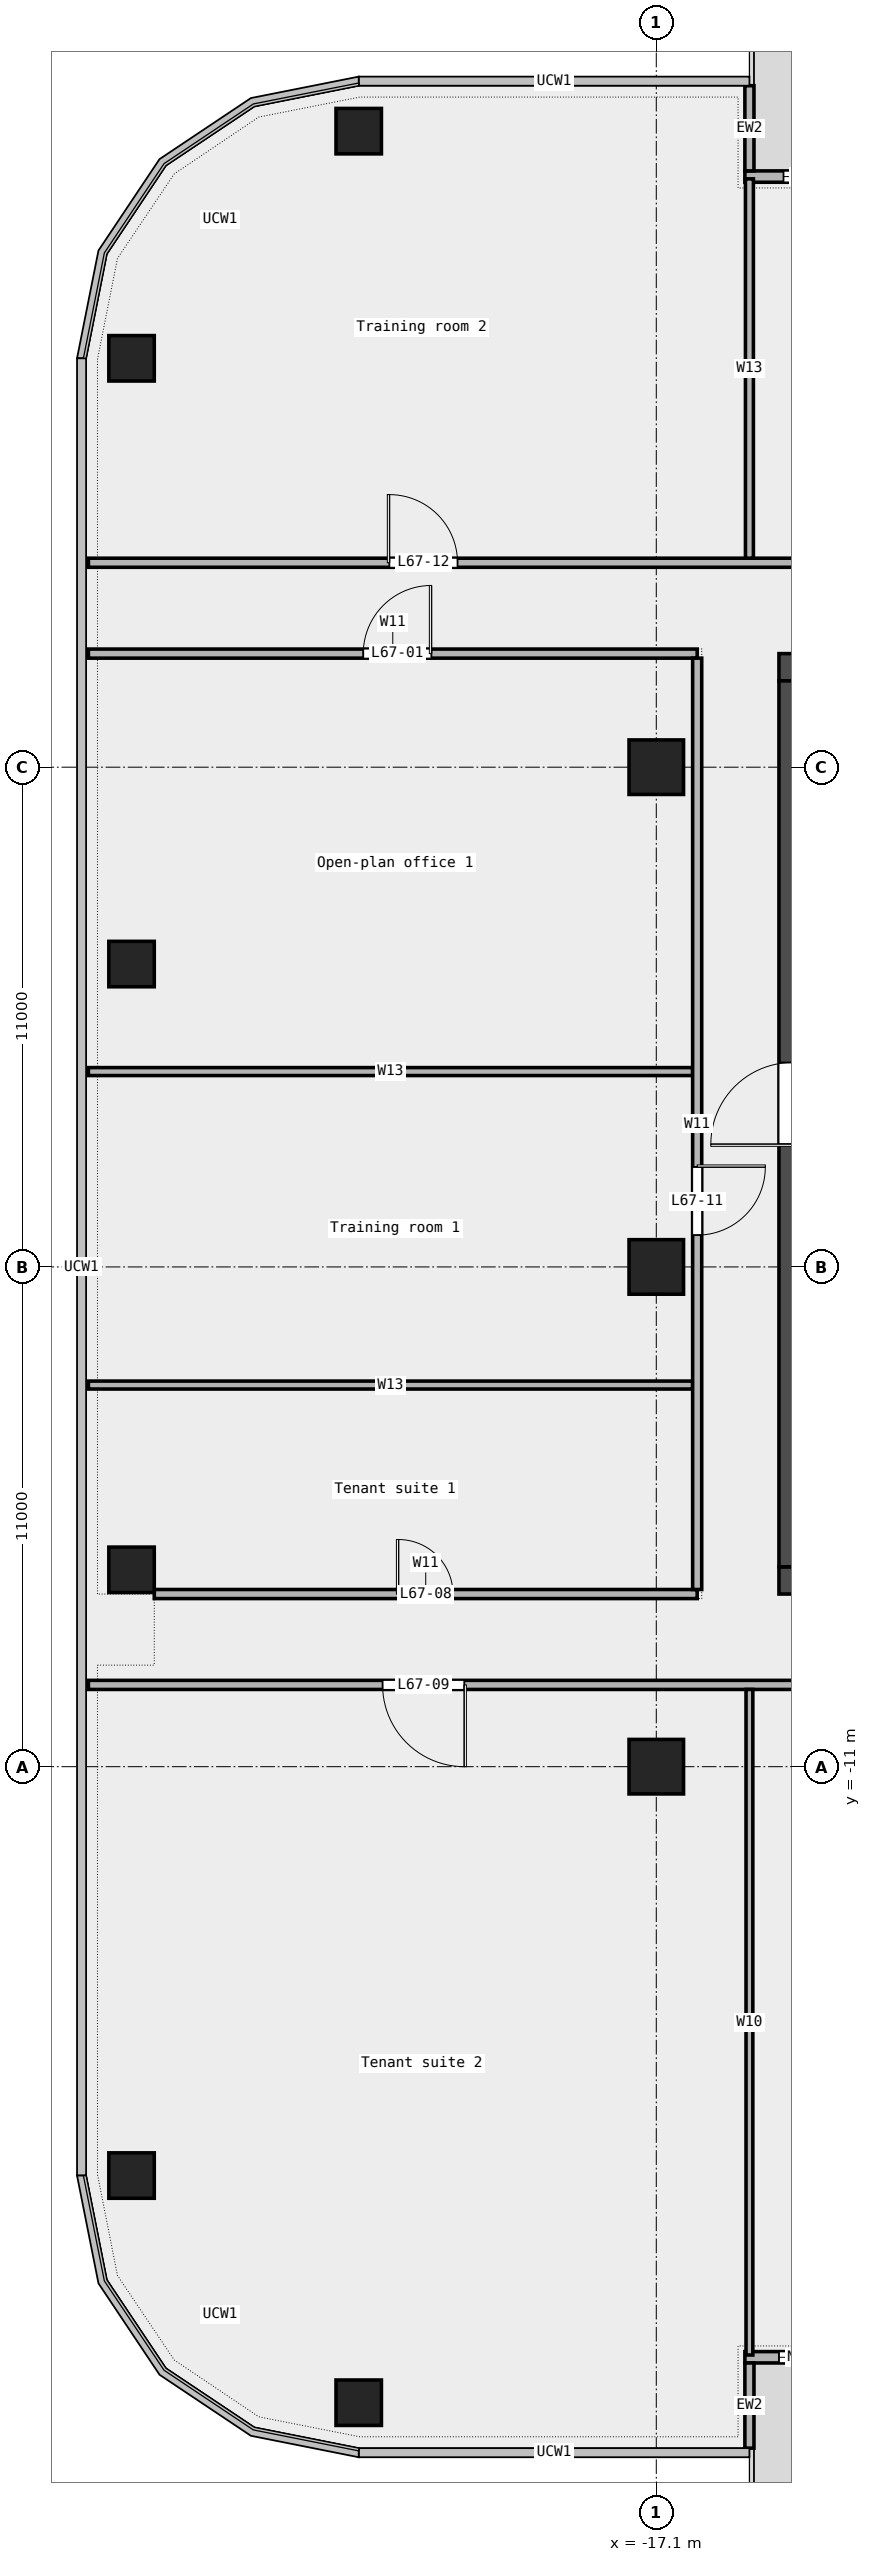
"""IFC4 building model, lengths in metres.
Left out: names, types, materials, properties, quantities, classifications, styles, units other than length and angle.
Written with IfcOpenShell. Run it as: python <this file> out.ifc"""

import sys

from ifc_helpers import new_model, si_unit, direction, frame, frame_2d, origin, origin_2d, place, context, subcontext, project, spatial, rectangle, extrude, element, fill, save


model = new_model("IFC4")
c1 = context("Model", 3, precision=1e-05, world=origin(), true_north=direction((0.0, 1.0)))
c2 = subcontext(c1, "Body", "Model", "MODEL_VIEW")
j1 = project(units=[si_unit("LENGTHUNIT", "METRE"), si_unit("PLANEANGLEUNIT", "RADIAN")], contexts=[c1])
p1 = place(None, origin())
s1 = spatial("IfcSite", under=j1, at=p1, CompositionType="ELEMENT")
p2 = place(p1, origin())
s2 = spatial("IfcBuilding", under=s1, at=p2, CompositionType="ELEMENT")
p3 = place(p2, frame((0.0, 0.0, 307.4)))
s3 = spatial("IfcBuildingStorey", under=s2, at=p3, CompositionType="ELEMENT", Elevation=307.4)
for number, where, z_axis, x_axis in (
    (1, (-23.65, -25.0, 0.0), (0.0, 0.0, 1.0), (1.0, 0.0, 0.0)),
    (2, (-23.65, 25.0, 0.0), (0.0, 0.0, 1.0), (1.0, 0.0, 0.0)),
    (3, (-28.65, 20.0, 0.0), (0.0, 0.0, 1.0), (1.0, 0.0, 0.0)),
    (4, (-28.65, 6.667, 0.0), (0.0, 0.0, 1.0), (1.0, 0.0, 0.0)),
    (5, (-28.65, -6.667, 0.0), (0.0, 0.0, 1.0), (1.0, 0.0, 0.0)),
    (6, (-28.65, -20.0, 0.0), (0.0, 0.0, 1.0), (1.0, 0.0, 0.0)),
):
    element("IfcColumn", number, at=place(p3, frame(where, z_axis=z_axis, x_axis=x_axis)), inside=s3, PredefinedType="COLUMN", context=c2, shape_type="SweptSolid", body=[
        extrude(rectangle(XDim=1.0, YDim=1.0, at=origin_2d()), origin(), (0.0, 0.0, 1.0), 3.6),
    ])
for number, where, z_axis, x_axis in (
    (7, (-17.1, -11.0, 0.0), (0.0, 0.0, 1.0), (1.0, 0.0, 0.0)),
    (8, (-17.1, 0.0, 0.0), (0.0, 0.0, 1.0), (1.0, 0.0, 0.0)),
    (9, (-17.1, 11.0, 0.0), (0.0, 0.0, 1.0), (1.0, 0.0, 0.0)),
):
    element("IfcColumn", number, at=place(p3, frame(where, z_axis=z_axis, x_axis=x_axis)), inside=s3, PredefinedType="COLUMN", context=c2, shape_type="SweptSolid", body=[
        extrude(rectangle(XDim=1.2, YDim=1.2, at=origin_2d()), origin(), (0.0, 0.0, 1.0), 3.6),
    ])
p4 = place(p3, frame((-2.05, 24.0, 0.0), z_axis=(0.0, 0.0, 1.0), x_axis=(-1.0, 0.0, 0.0)))
e10 = element("IfcWall", 10, at=p4, inside=s3, PredefinedType="STANDARD", context=c2, shape_type="SweptSolid", body=[
    extrude(rectangle(XDim=13.1, YDim=0.25, at=frame_2d((6.55, 0.0))), origin(), (0.0, 0.0, 1.0), 3.6),
])
p5 = place(p4, frame((1.5, 0.0, 0.45)))
e11 = element("IfcOpeningElement", 11, at=p5, cuts=e10, PredefinedType="OPENING", context=c2, shape_type="SweptSolid", body=[
    extrude(rectangle(XDim=1.5, YDim=2.4, at=frame_2d((0.75, 1.2))), frame((0.0, 0.137, 0.0), z_axis=(0.0, -1.0, 0.0), x_axis=(1.0, 0.0, 0.0)), (0.0, 0.0, 1.0), 0.274),
])
p6 = place(p4, frame((5.75, 0.0, 0.0)))
e12 = element("IfcOpeningElement", 12, at=p6, cuts=e10, PredefinedType="OPENING", context=c2, shape_type="SweptSolid", body=[
    extrude(rectangle(XDim=1.8, YDim=2.4, at=frame_2d((0.9, 1.2))), frame((0.0, 0.137, 0.0), z_axis=(0.0, -1.0, 0.0), x_axis=(1.0, 0.0, 0.0)), (0.0, 0.0, 1.0), 0.274),
])
p7 = place(p4, frame((10.75, 0.0, 0.45)))
e13 = element("IfcOpeningElement", 13, at=p7, cuts=e10, PredefinedType="OPENING", context=c2, shape_type="SweptSolid", body=[
    extrude(rectangle(XDim=1.5, YDim=2.4, at=frame_2d((0.75, 1.2))), frame((0.0, 0.137, 0.0), z_axis=(0.0, -1.0, 0.0), x_axis=(1.0, 0.0, 0.0)), (0.0, 0.0, 1.0), 0.274),
])
p8 = place(p3, frame((-15.05, 26.0, 0.0), z_axis=(0.0, 0.0, 1.0), x_axis=(0.0, -1.0, 0.0)))
e14 = element("IfcWall", 14, at=p8, inside=s3, PredefinedType="STANDARD", context=c2, shape_type="SweptSolid", body=[
    extrude(rectangle(XDim=1.875, YDim=0.2, at=frame_2d((0.938, 0.0))), origin(), (0.0, 0.0, 1.0), 3.6),
])
p9 = place(p3, frame((-15.15, -24.0, 0.0), z_axis=(0.0, 0.0, 1.0), x_axis=(1.0, 0.0, 0.0)))
e15 = element("IfcWall", 15, at=p9, inside=s3, PredefinedType="STANDARD", context=c2, shape_type="SweptSolid", body=[
    extrude(rectangle(XDim=13.1, YDim=0.25, at=frame_2d((6.55, 0.0))), origin(), (0.0, 0.0, 1.0), 3.6),
])
p10 = place(p9, frame((0.75, 0.0, 0.45)))
e16 = element("IfcOpeningElement", 16, at=p10, cuts=e15, PredefinedType="OPENING", context=c2, shape_type="SweptSolid", body=[
    extrude(rectangle(XDim=1.5, YDim=2.4, at=frame_2d((0.75, 1.2))), frame((0.0, 0.137, 0.0), z_axis=(0.0, -1.0, 0.0), x_axis=(1.0, 0.0, 0.0)), (0.0, 0.0, 1.0), 0.274),
])
p11 = place(p9, frame((5.75, 0.0, 0.0)))
e17 = element("IfcOpeningElement", 17, at=p11, cuts=e15, PredefinedType="OPENING", context=c2, shape_type="SweptSolid", body=[
    extrude(rectangle(XDim=1.8, YDim=2.4, at=frame_2d((0.9, 1.2))), frame((0.0, 0.137, 0.0), z_axis=(0.0, -1.0, 0.0), x_axis=(1.0, 0.0, 0.0)), (0.0, 0.0, 1.0), 0.274),
])
p12 = place(p9, frame((10.0, 0.0, 0.45)))
e18 = element("IfcOpeningElement", 18, at=p12, cuts=e15, PredefinedType="OPENING", context=c2, shape_type="SweptSolid", body=[
    extrude(rectangle(XDim=1.5, YDim=2.4, at=frame_2d((0.75, 1.2))), frame((0.0, 0.137, 0.0), z_axis=(0.0, -1.0, 0.0), x_axis=(1.0, 0.0, 0.0)), (0.0, 0.0, 1.0), 0.274),
])
p13 = place(p3, frame((-15.05, -26.0, 0.0), z_axis=(0.0, 0.0, 1.0), x_axis=(0.0, 1.0, 0.0)))
e19 = element("IfcWall", 19, at=p13, inside=s3, PredefinedType="STANDARD", context=c2, shape_type="SweptSolid", body=[
    extrude(rectangle(XDim=1.875, YDim=0.2, at=frame_2d((0.938, 0.0))), origin(), (0.0, 0.0, 1.0), 3.6),
])
p14 = place(p3, frame((-29.6, -9.2, 0.0), z_axis=(0.0, 0.0, 1.0), x_axis=(1.0, 0.0, 0.0)))
e20 = element("IfcWall", 20, at=p14, inside=s3, PredefinedType="PARTITIONING", context=c2, shape_type="SweptSolid", body=[
    extrude(rectangle(XDim=59.2, YDim=0.2, at=frame_2d((29.6, 0.0))), origin(), (0.0, 0.0, 1.0), 3.6),
])
p15 = place(p14, frame((47.615, 0.0, 0.0)))
e21 = element("IfcOpeningElement", 21, at=p15, cuts=e20, PredefinedType="OPENING", context=c2, shape_type="SweptSolid", body=[
    extrude(rectangle(XDim=1.8, YDim=2.1, at=frame_2d((0.9, 1.05))), frame((0.0, 0.112, 0.0), z_axis=(0.0, -1.0, 0.0), x_axis=(1.0, 0.0, 0.0)), (0.0, 0.0, 1.0), 0.224),
])
p16 = place(p14, frame((20.1, 0.0, 0.0)))
e22 = element("IfcOpeningElement", 22, at=p16, cuts=e20, PredefinedType="OPENING", context=c2, shape_type="SweptSolid", body=[
    extrude(rectangle(XDim=1.8, YDim=2.1, at=frame_2d((0.9, 1.05))), frame((0.0, 0.112, 0.0), z_axis=(0.0, -1.0, 0.0), x_axis=(1.0, 0.0, 0.0)), (0.0, 0.0, 1.0), 0.224),
])
p17 = place(p14, frame((6.475, 0.0, 0.0)))
e23 = element("IfcOpeningElement", 23, at=p17, cuts=e20, PredefinedType="OPENING", context=c2, shape_type="SweptSolid", body=[
    extrude(rectangle(XDim=1.8, YDim=2.1, at=frame_2d((0.9, 1.05))), frame((0.0, 0.112, 0.0), z_axis=(0.0, -1.0, 0.0), x_axis=(1.0, 0.0, 0.0)), (0.0, 0.0, 1.0), 0.224),
])
p18 = place(p14, frame((31.09, 0.0, 0.0)))
e24 = element("IfcOpeningElement", 24, at=p18, cuts=e20, PredefinedType="OPENING", context=c2, shape_type="SweptSolid", body=[
    extrude(rectangle(XDim=1.5, YDim=2.1, at=frame_2d((0.75, 1.05))), frame((0.0, 0.112, 0.0), z_axis=(0.0, -1.0, 0.0), x_axis=(1.0, 0.0, 0.0)), (0.0, 0.0, 1.0), 0.224),
])
p19 = place(p3, frame((-28.15, -7.2, 0.0), z_axis=(0.0, 0.0, 1.0), x_axis=(1.0, 0.0, 0.0)))
e25 = element("IfcWall", 25, at=p19, inside=s3, PredefinedType="PARTITIONING", context=c2, shape_type="SweptSolid", body=[
    extrude(rectangle(XDim=11.95, YDim=0.2, at=frame_2d((5.975, 0.0))), origin(), (0.0, 0.0, 1.0), 3.6),
])
p20 = place(p19, frame((5.375, 0.0, 0.0)))
e26 = element("IfcOpeningElement", 26, at=p20, cuts=e25, PredefinedType="OPENING", context=c2, shape_type="SweptSolid", body=[
    extrude(rectangle(XDim=1.2, YDim=2.1, at=frame_2d((0.6, 1.05))), frame((0.0, 0.112, 0.0), z_axis=(0.0, -1.0, 0.0), x_axis=(1.0, 0.0, 0.0)), (0.0, 0.0, 1.0), 0.224),
])
for number, where, z_axis, x_axis in (
    (27, (-29.6, -2.6, 0.0), (0.0, 0.0, 1.0), (1.0, 0.0, 0.0)),
    (28, (-29.6, 4.3, 0.0), (0.0, 0.0, 1.0), (1.0, 0.0, 0.0)),
):
    element("IfcWall", number, at=place(p3, frame(where, z_axis=z_axis, x_axis=x_axis)), inside=s3, PredefinedType="PARTITIONING", context=c2, shape_type="SweptSolid", body=[
        extrude(rectangle(XDim=13.3, YDim=0.175, at=frame_2d((6.65, 0.0))), origin(), (0.0, 0.0, 1.0), 3.6),
    ])
p21 = place(p3, frame((-29.6, 13.5, 0.0), z_axis=(0.0, 0.0, 1.0), x_axis=(1.0, 0.0, 0.0)))
e29 = element("IfcWall", 29, at=p21, inside=s3, PredefinedType="PARTITIONING", context=c2, shape_type="SweptSolid", body=[
    extrude(rectangle(XDim=13.4, YDim=0.2, at=frame_2d((6.7, 0.0))), origin(), (0.0, 0.0, 1.0), 3.6),
])
p22 = place(p21, frame((6.05, 0.0, 0.0)))
e30 = element("IfcOpeningElement", 30, at=p22, cuts=e29, PredefinedType="OPENING", context=c2, shape_type="SweptSolid", body=[
    extrude(rectangle(XDim=1.5, YDim=2.1, at=frame_2d((0.75, 1.05))), frame((0.0, 0.112, 0.0), z_axis=(0.0, -1.0, 0.0), x_axis=(1.0, 0.0, 0.0)), (0.0, 0.0, 1.0), 0.224),
])
p23 = place(p3, frame((-29.6, 15.5, 0.0), z_axis=(0.0, 0.0, 1.0), x_axis=(1.0, 0.0, 0.0)))
e31 = element("IfcWall", 31, at=p23, inside=s3, PredefinedType="PARTITIONING", context=c2, shape_type="SweptSolid", body=[
    extrude(rectangle(XDim=59.2, YDim=0.2, at=frame_2d((29.6, 0.0))), origin(), (0.0, 0.0, 1.0), 3.6),
])
p24 = place(p23, frame((20.25, 0.0, 0.0)))
e32 = element("IfcOpeningElement", 32, at=p24, cuts=e31, PredefinedType="OPENING", context=c2, shape_type="SweptSolid", body=[
    extrude(rectangle(XDim=1.5, YDim=2.1, at=frame_2d((0.75, 1.05))), frame((0.0, 0.112, 0.0), z_axis=(0.0, -1.0, 0.0), x_axis=(1.0, 0.0, 0.0)), (0.0, 0.0, 1.0), 0.224),
])
p25 = place(p23, frame((49.825, 0.0, 0.0)))
e33 = element("IfcOpeningElement", 33, at=p25, cuts=e31, PredefinedType="OPENING", context=c2, shape_type="SweptSolid", body=[
    extrude(rectangle(XDim=1.8, YDim=2.1, at=frame_2d((0.9, 1.05))), frame((0.0, 0.112, 0.0), z_axis=(0.0, -1.0, 0.0), x_axis=(1.0, 0.0, 0.0)), (0.0, 0.0, 1.0), 0.224),
])
p26 = place(p23, frame((34.05, 0.0, 0.0)))
e34 = element("IfcOpeningElement", 34, at=p26, cuts=e31, PredefinedType="OPENING", context=c2, shape_type="SweptSolid", body=[
    extrude(rectangle(XDim=1.8, YDim=2.1, at=frame_2d((0.9, 1.05))), frame((0.0, 0.112, 0.0), z_axis=(0.0, -1.0, 0.0), x_axis=(1.0, 0.0, 0.0)), (0.0, 0.0, 1.0), 0.224),
])
p27 = place(p23, frame((6.625, 0.0, 0.0)))
e35 = element("IfcOpeningElement", 35, at=p27, cuts=e31, PredefinedType="OPENING", context=c2, shape_type="SweptSolid", body=[
    extrude(rectangle(XDim=1.5, YDim=2.1, at=frame_2d((0.75, 1.05))), frame((0.0, 0.112, 0.0), z_axis=(0.0, -1.0, 0.0), x_axis=(1.0, 0.0, 0.0)), (0.0, 0.0, 1.0), 0.224),
])
p28 = place(p3, frame((-16.2, -7.1, 0.0), z_axis=(0.0, 0.0, 1.0), x_axis=(0.0, 1.0, 0.0)))
e36 = element("IfcWall", 36, at=p28, inside=s3, PredefinedType="PARTITIONING", context=c2, shape_type="SweptSolid", body=[
    extrude(rectangle(XDim=20.5, YDim=0.2, at=frame_2d((10.25, 0.0))), origin(), (0.0, 0.0, 1.0), 3.6),
])
p29 = place(p28, frame((7.8, 0.0, 0.0)))
e37 = element("IfcOpeningElement", 37, at=p29, cuts=e36, PredefinedType="OPENING", context=c2, shape_type="SweptSolid", body=[
    extrude(rectangle(XDim=1.5, YDim=2.1, at=frame_2d((0.75, 1.05))), frame((0.0, 0.112, 0.0), z_axis=(0.0, -1.0, 0.0), x_axis=(1.0, 0.0, 0.0)), (0.0, 0.0, 1.0), 0.224),
])
p30 = place(p3, frame((-15.05, -23.95, 0.0), z_axis=(0.0, 0.0, 1.0), x_axis=(0.0, 1.0, 0.0)))
e38 = element("IfcWall", 38, at=p30, inside=s3, PredefinedType="PARTITIONING", context=c2, shape_type="SweptSolid", body=[
    extrude(rectangle(XDim=14.65, YDim=0.15, at=frame_2d((7.325, 0.0))), origin(), (0.0, 0.0, 1.0), 3.6),
])
p31 = place(p3, frame((-15.05, 15.6, 0.0), z_axis=(0.0, 0.0, 1.0), x_axis=(0.0, 1.0, 0.0)))
e39 = element("IfcWall", 39, at=p31, inside=s3, PredefinedType="PARTITIONING", context=c2, shape_type="SweptSolid", body=[
    extrude(rectangle(XDim=8.35, YDim=0.175, at=frame_2d((4.175, 0.0))), origin(), (0.0, 0.0, 1.0), 3.6),
])
p32 = place(p3, frame((-14.4, -6.9, 0.0), z_axis=(0.0, 0.0, 1.0), x_axis=(1.0, 0.0, 0.0)))
e40 = element("IfcWall", 40, at=p32, inside=s3, PredefinedType="SHEAR", context=c2, shape_type="SweptSolid", body=[
    extrude(rectangle(XDim=28.8, YDim=0.6, at=frame_2d((14.4, 0.0))), origin(), (0.0, 0.0, 1.0), 3.7),
])
p33 = place(p32, frame((4.337, 0.0, 0.0)))
e41 = element("IfcOpeningElement", 41, at=p33, cuts=e40, PredefinedType="OPENING", context=c2, shape_type="SweptSolid", body=[
    extrude(rectangle(XDim=1.0, YDim=2.1, at=frame_2d((0.5, 1.05))), frame((0.0, 0.312, 0.0), z_axis=(0.0, -1.0, 0.0), x_axis=(1.0, 0.0, 0.0)), (0.0, 0.0, 1.0), 0.624),
])
p34 = place(p32, frame((6.212, 0.0, 0.0)))
e42 = element("IfcOpeningElement", 42, at=p34, cuts=e40, PredefinedType="OPENING", context=c2, shape_type="SweptSolid", body=[
    extrude(rectangle(XDim=1.0, YDim=2.1, at=frame_2d((0.5, 1.05))), frame((0.0, 0.312, 0.0), z_axis=(0.0, -1.0, 0.0), x_axis=(1.0, 0.0, 0.0)), (0.0, 0.0, 1.0), 0.624),
])
p35 = place(p32, frame((10.8, 0.0, 0.0)))
e43 = element("IfcOpeningElement", 43, at=p35, cuts=e40, PredefinedType="OPENING", context=c2, shape_type="SweptSolid", body=[
    extrude(rectangle(XDim=1.2, YDim=2.1, at=frame_2d((0.6, 1.05))), frame((0.0, 0.312, 0.0), z_axis=(0.0, -1.0, 0.0), x_axis=(1.0, 0.0, 0.0)), (0.0, 0.0, 1.0), 0.624),
])
p36 = place(p32, frame((15.587, 0.0, 0.0)))
e44 = element("IfcOpeningElement", 44, at=p36, cuts=e40, PredefinedType="OPENING", context=c2, shape_type="SweptSolid", body=[
    extrude(rectangle(XDim=1.0, YDim=2.1, at=frame_2d((0.5, 1.05))), frame((0.0, 0.312, 0.0), z_axis=(0.0, -1.0, 0.0), x_axis=(1.0, 0.0, 0.0)), (0.0, 0.0, 1.0), 0.624),
])
p37 = place(p32, frame((18.75, 0.0, 0.0)))
e45 = element("IfcOpeningElement", 45, at=p37, cuts=e40, PredefinedType="OPENING", context=c2, shape_type="SweptSolid", body=[
    extrude(rectangle(XDim=1.8, YDim=2.1, at=frame_2d((0.9, 1.05))), frame((0.0, 0.312, 0.0), z_axis=(0.0, -1.0, 0.0), x_axis=(1.0, 0.0, 0.0)), (0.0, 0.0, 1.0), 0.624),
])
p38 = place(p32, frame((23.087, 0.0, 0.0)))
e46 = element("IfcOpeningElement", 46, at=p38, cuts=e40, PredefinedType="OPENING", context=c2, shape_type="SweptSolid", body=[
    extrude(rectangle(XDim=1.0, YDim=2.1, at=frame_2d((0.5, 1.05))), frame((0.0, 0.312, 0.0), z_axis=(0.0, -1.0, 0.0), x_axis=(1.0, 0.0, 0.0)), (0.0, 0.0, 1.0), 0.624),
])
p39 = place(p3, frame((-14.4, 13.2, 0.0), z_axis=(0.0, 0.0, 1.0), x_axis=(1.0, 0.0, 0.0)))
e47 = element("IfcWall", 47, at=p39, inside=s3, PredefinedType="SHEAR", context=c2, shape_type="SweptSolid", body=[
    extrude(rectangle(XDim=28.8, YDim=0.6, at=frame_2d((14.4, 0.0))), origin(), (0.0, 0.0, 1.0), 3.7),
])
p40 = place(p39, frame((6.3, 0.0, 0.0)))
e48 = element("IfcOpeningElement", 48, at=p40, cuts=e47, PredefinedType="OPENING", context=c2, shape_type="SweptSolid", body=[
    extrude(rectangle(XDim=1.2, YDim=2.1, at=frame_2d((0.6, 1.05))), frame((0.0, 0.312, 0.0), z_axis=(0.0, -1.0, 0.0), x_axis=(1.0, 0.0, 0.0)), (0.0, 0.0, 1.0), 0.624),
])
p41 = place(p39, frame((21.3, 0.0, 0.0)))
e49 = element("IfcOpeningElement", 49, at=p41, cuts=e47, PredefinedType="OPENING", context=c2, shape_type="SweptSolid", body=[
    extrude(rectangle(XDim=1.2, YDim=2.1, at=frame_2d((0.6, 1.05))), frame((0.0, 0.312, 0.0), z_axis=(0.0, -1.0, 0.0), x_axis=(1.0, 0.0, 0.0)), (0.0, 0.0, 1.0), 0.624),
])
p42 = place(p3, frame((-14.1, -6.6, 0.0), z_axis=(0.0, 0.0, 1.0), x_axis=(0.0, 1.0, 0.0)))
e50 = element("IfcWall", 50, at=p42, inside=s3, PredefinedType="SHEAR", context=c2, shape_type="SweptSolid", body=[
    extrude(rectangle(XDim=19.5, YDim=0.6, at=frame_2d((9.75, 0.0))), origin(), (0.0, 0.0, 1.0), 3.7),
])
p43 = place(p42, frame((9.3, 0.0, 0.0)))
e51 = element("IfcOpeningElement", 51, at=p43, cuts=e50, PredefinedType="OPENING", context=c2, shape_type="SweptSolid", body=[
    extrude(rectangle(XDim=1.8, YDim=2.1, at=frame_2d((0.9, 1.05))), frame((0.0, 0.312, 0.0), z_axis=(0.0, -1.0, 0.0), x_axis=(1.0, 0.0, 0.0)), (0.0, 0.0, 1.0), 0.624),
])
p44 = place(p7, origin())
e52 = element("IfcWindow", 52, at=p44, inside=s3, PartitioningType="SINGLE_PANEL", PredefinedType="WINDOW", context=c2, shape_type="SweptSolid", body=[
    extrude(rectangle(XDim=1.5, YDim=2.4, at=frame_2d((0.75, 1.2))), frame((0.0, 0.03, 0.0), z_axis=(0.0, -1.0, 0.0), x_axis=(1.0, 0.0, 0.0)), (0.0, 0.0, 1.0), 0.06),
])
fill(e13, e52)
p45 = place(p10, origin())
e53 = element("IfcWindow", 53, at=p45, inside=s3, PartitioningType="SINGLE_PANEL", PredefinedType="WINDOW", context=c2, shape_type="SweptSolid", body=[
    extrude(rectangle(XDim=1.5, YDim=2.4, at=frame_2d((0.75, 1.2))), frame((0.0, 0.03, 0.0), z_axis=(0.0, -1.0, 0.0), x_axis=(1.0, 0.0, 0.0)), (0.0, 0.0, 1.0), 0.06),
])
fill(e16, e53)
p46 = place(p22, origin())
e54 = element("IfcDoor", 54, at=p46, inside=s3, OperationType="DOUBLE_DOOR_SINGLE_SWING", PredefinedType="DOOR", context=c2, shape_type="SweptSolid", body=[
    extrude(rectangle(XDim=1.5, YDim=2.1, at=frame_2d((0.75, 1.05))), frame((0.0, 0.025, 0.0), z_axis=(0.0, -1.0, 0.0), x_axis=(1.0, 0.0, 0.0)), (0.0, 0.0, 1.0), 0.05),
])
fill(e30, e54)
p47 = place(p20, origin())
e55 = element("IfcDoor", 55, at=p47, inside=s3, OperationType="SINGLE_SWING_LEFT", PredefinedType="DOOR", context=c2, shape_type="SweptSolid", body=[
    extrude(rectangle(XDim=1.2, YDim=2.1, at=frame_2d((0.6, 1.05))), frame((0.0, 0.025, 0.0), z_axis=(0.0, -1.0, 0.0), x_axis=(1.0, 0.0, 0.0)), (0.0, 0.0, 1.0), 0.05),
])
fill(e26, e55)
p48 = place(p17, origin())
e56 = element("IfcDoor", 56, at=p48, inside=s3, OperationType="DOUBLE_DOOR_SINGLE_SWING", PredefinedType="DOOR", context=c2, shape_type="SweptSolid", body=[
    extrude(rectangle(XDim=1.8, YDim=2.1, at=frame_2d((0.9, 1.05))), frame((0.0, 0.025, 0.0), z_axis=(0.0, -1.0, 0.0), x_axis=(1.0, 0.0, 0.0)), (0.0, 0.0, 1.0), 0.05),
])
fill(e23, e56)
p49 = place(p29, origin())
e57 = element("IfcDoor", 57, at=p49, inside=s3, OperationType="DOUBLE_DOOR_SINGLE_SWING", PredefinedType="DOOR", context=c2, shape_type="SweptSolid", body=[
    extrude(rectangle(XDim=1.5, YDim=2.1, at=frame_2d((0.75, 1.05))), frame((0.0, 0.025, 0.0), z_axis=(0.0, -1.0, 0.0), x_axis=(1.0, 0.0, 0.0)), (0.0, 0.0, 1.0), 0.05),
])
fill(e37, e57)
p50 = place(p27, origin())
e58 = element("IfcDoor", 58, at=p50, inside=s3, OperationType="DOUBLE_DOOR_SINGLE_SWING", PredefinedType="DOOR", context=c2, shape_type="SweptSolid", body=[
    extrude(rectangle(XDim=1.5, YDim=2.1, at=frame_2d((0.75, 1.05))), frame((0.0, 0.025, 0.0), z_axis=(0.0, -1.0, 0.0), x_axis=(1.0, 0.0, 0.0)), (0.0, 0.0, 1.0), 0.05),
])
fill(e35, e58)
save(model, sys.argv[1])
